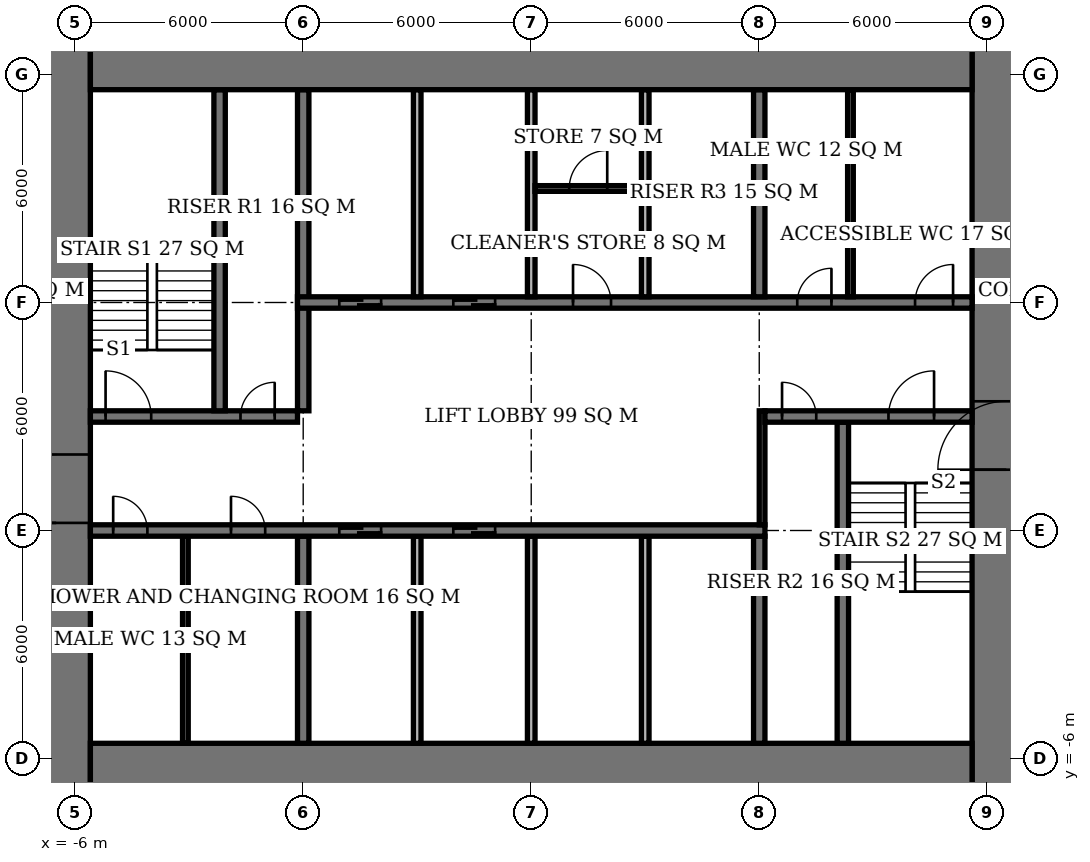
"""IFC4 building model, lengths in metres.
Left out: names, types, materials, properties, quantities, classifications, styles, units other than length and angle.
Written with IfcOpenShell. Run it as: python <this file> out.ifc"""

import sys

from ifc_helpers import new_model, si_unit, direction, frame, frame_2d, origin, place, context, subcontext, project, spatial, rectangle, extrude, element, fill, save


model = new_model("IFC4")
c1 = context("Model", 3, precision=1e-05, world=origin(), true_north=direction((0.0, 1.0)))
c2 = subcontext(c1, "Body", "Model", "MODEL_VIEW")
j1 = project(units=[si_unit("LENGTHUNIT", "METRE"), si_unit("PLANEANGLEUNIT", "RADIAN")], contexts=[c1])
p1 = place(None, origin())
s1 = spatial("IfcSite", under=j1, at=p1, CompositionType="ELEMENT")
p2 = place(p1, origin())
s2 = spatial("IfcBuilding", under=s1, at=p2, CompositionType="ELEMENT")
p3 = place(p2, frame((0.0, 0.0, 136.7)))
s3 = spatial("IfcBuildingStorey", under=s2, at=p3, CompositionType="ELEMENT", Elevation=136.7)
for number, where, z_axis, x_axis in (
    (1, (-5.6, -6.6, 0.0), (0.0, 0.0, 1.0), (1.0, 0.0, 0.0)),
    (2, (-5.6, 12.6, 0.0), (0.0, 0.0, 1.0), (1.0, 0.0, 0.0)),
):
    element("IfcWall", number, at=place(p3, frame(where, z_axis=z_axis, x_axis=x_axis)), inside=s3, PredefinedType="SHEAR", context=c2, shape_type="SweptSolid", body=[
        extrude(rectangle(XDim=23.2, YDim=2.0, at=frame_2d((11.6, 0.0))), origin(), (0.0, 0.0, 1.0), 3.9),
    ])
p4 = place(p3, frame((-6.5, -7.6, 0.0), z_axis=(0.0, 0.0, 1.0), x_axis=(0.0, 1.0, 0.0)))
e3 = element("IfcWall", 3, at=p4, inside=s3, PredefinedType="SHEAR", context=c2, shape_type="SweptSolid", body=[
    extrude(rectangle(XDim=21.2, YDim=1.8, at=frame_2d((10.6, 0.0))), origin(), (0.0, 0.0, 1.0), 3.9),
])
p5 = place(p4, frame((7.8, 0.0, 0.0)))
e4 = element("IfcOpeningElement", 4, at=p5, cuts=e3, PredefinedType="OPENING", context=c2, shape_type="SweptSolid", body=[
    extrude(rectangle(XDim=1.8, YDim=2.4, at=frame_2d((0.9, 1.2))), frame((0.0, 0.91, 0.0), z_axis=(0.0, -1.0, 0.0), x_axis=(1.0, 0.0, 0.0)), (0.0, 0.0, 1.0), 1.82),
])
p6 = place(p3, frame((18.5, -7.6, 0.0), z_axis=(0.0, 0.0, 1.0), x_axis=(0.0, 1.0, 0.0)))
e5 = element("IfcWall", 5, at=p6, inside=s3, PredefinedType="SHEAR", context=c2, shape_type="SweptSolid", body=[
    extrude(rectangle(XDim=21.2, YDim=1.8, at=frame_2d((10.6, 0.0))), origin(), (0.0, 0.0, 1.0), 3.9),
])
p7 = place(p6, frame((9.2, 0.0, 0.0)))
e6 = element("IfcOpeningElement", 6, at=p7, cuts=e5, PredefinedType="OPENING", context=c2, shape_type="SweptSolid", body=[
    extrude(rectangle(XDim=1.8, YDim=2.4, at=frame_2d((0.9, 1.2))), frame((0.0, 0.91, 0.0), z_axis=(0.0, -1.0, 0.0), x_axis=(1.0, 0.0, 0.0)), (0.0, 0.0, 1.0), 1.82),
])
p8 = place(p3, frame((-5.6, 0.0, 0.0), z_axis=(0.0, 0.0, 1.0), x_axis=(1.0, 0.0, 0.0)))
e7 = element("IfcWall", 7, at=p8, inside=s3, PredefinedType="SHEAR", context=c2, shape_type="SweptSolid", body=[
    extrude(rectangle(XDim=17.75, YDim=0.3, at=frame_2d((8.875, 0.0))), origin(), (0.0, 0.0, 1.0), 3.9),
])
p9 = place(p8, frame((0.6, 0.0, 0.0)))
e8 = element("IfcOpeningElement", 8, at=p9, cuts=e7, PredefinedType="OPENING", context=c2, shape_type="SweptSolid", body=[
    extrude(rectangle(XDim=0.9, YDim=2.1, at=frame_2d((0.45, 1.05))), frame((0.0, 0.16, 0.0), z_axis=(0.0, -1.0, 0.0), x_axis=(1.0, 0.0, 0.0)), (0.0, 0.0, 1.0), 0.32),
])
p10 = place(p8, frame((3.7, 0.0, 0.0)))
e9 = element("IfcOpeningElement", 9, at=p10, cuts=e7, PredefinedType="OPENING", context=c2, shape_type="SweptSolid", body=[
    extrude(rectangle(XDim=0.9, YDim=2.1, at=frame_2d((0.45, 1.05))), frame((0.0, 0.16, 0.0), z_axis=(0.0, -1.0, 0.0), x_axis=(1.0, 0.0, 0.0)), (0.0, 0.0, 1.0), 0.32),
])
p11 = place(p8, frame((6.55, 0.0, 0.0)))
e10 = element("IfcOpeningElement", 10, at=p11, cuts=e7, PredefinedType="OPENING", context=c2, shape_type="SweptSolid", body=[
    extrude(rectangle(XDim=1.1, YDim=2.1, at=frame_2d((0.55, 1.05))), frame((0.0, 0.16, 0.0), z_axis=(0.0, -1.0, 0.0), x_axis=(1.0, 0.0, 0.0)), (0.0, 0.0, 1.0), 0.32),
])
p12 = place(p8, frame((9.55, 0.0, 0.0)))
e11 = element("IfcOpeningElement", 11, at=p12, cuts=e7, PredefinedType="OPENING", context=c2, shape_type="SweptSolid", body=[
    extrude(rectangle(XDim=1.1, YDim=2.1, at=frame_2d((0.55, 1.05))), frame((0.0, 0.16, 0.0), z_axis=(0.0, -1.0, 0.0), x_axis=(1.0, 0.0, 0.0)), (0.0, 0.0, 1.0), 0.32),
])
p13 = place(p3, frame((-5.6, 3.0, 0.0), z_axis=(0.0, 0.0, 1.0), x_axis=(1.0, 0.0, 0.0)))
e12 = element("IfcWall", 12, at=p13, inside=s3, PredefinedType="SHEAR", context=c2, shape_type="SweptSolid", body=[
    extrude(rectangle(XDim=5.45, YDim=0.3, at=frame_2d((2.725, 0.0))), origin(), (0.0, 0.0, 1.0), 3.9),
])
p14 = place(p13, frame((0.4, 0.0, 0.0)))
e13 = element("IfcOpeningElement", 13, at=p14, cuts=e12, PredefinedType="OPENING", context=c2, shape_type="SweptSolid", body=[
    extrude(rectangle(XDim=1.2, YDim=2.1, at=frame_2d((0.6, 1.05))), frame((0.0, 0.16, 0.0), z_axis=(0.0, -1.0, 0.0), x_axis=(1.0, 0.0, 0.0)), (0.0, 0.0, 1.0), 0.32),
])
p15 = place(p13, frame((3.95, 0.0, 0.0)))
e14 = element("IfcOpeningElement", 14, at=p15, cuts=e12, PredefinedType="OPENING", context=c2, shape_type="SweptSolid", body=[
    extrude(rectangle(XDim=0.9, YDim=2.1, at=frame_2d((0.45, 1.05))), frame((0.0, 0.16, 0.0), z_axis=(0.0, -1.0, 0.0), x_axis=(1.0, 0.0, 0.0)), (0.0, 0.0, 1.0), 0.32),
])
p16 = place(p3, frame((12.15, 3.0, 0.0), z_axis=(0.0, 0.0, 1.0), x_axis=(1.0, 0.0, 0.0)))
e15 = element("IfcWall", 15, at=p16, inside=s3, PredefinedType="SHEAR", context=c2, shape_type="SweptSolid", body=[
    extrude(rectangle(XDim=5.45, YDim=0.3, at=frame_2d((2.725, 0.0))), origin(), (0.0, 0.0, 1.0), 3.9),
])
p17 = place(p16, frame((3.25, 0.0, 0.0)))
e16 = element("IfcOpeningElement", 16, at=p17, cuts=e15, PredefinedType="OPENING", context=c2, shape_type="SweptSolid", body=[
    extrude(rectangle(XDim=1.2, YDim=2.1, at=frame_2d((0.6, 1.05))), frame((0.0, 0.16, 0.0), z_axis=(0.0, -1.0, 0.0), x_axis=(1.0, 0.0, 0.0)), (0.0, 0.0, 1.0), 0.32),
])
p18 = place(p16, frame((0.45, 0.0, 0.0)))
e17 = element("IfcOpeningElement", 17, at=p18, cuts=e15, PredefinedType="OPENING", context=c2, shape_type="SweptSolid", body=[
    extrude(rectangle(XDim=0.9, YDim=2.1, at=frame_2d((0.45, 1.05))), frame((0.0, 0.16, 0.0), z_axis=(0.0, -1.0, 0.0), x_axis=(1.0, 0.0, 0.0)), (0.0, 0.0, 1.0), 0.32),
])
p19 = place(p3, frame((-0.15, 6.0, 0.0), z_axis=(0.0, 0.0, 1.0), x_axis=(1.0, 0.0, 0.0)))
e18 = element("IfcWall", 18, at=p19, inside=s3, PredefinedType="SHEAR", context=c2, shape_type="SweptSolid", body=[
    extrude(rectangle(XDim=17.75, YDim=0.3, at=frame_2d((8.875, 0.0))), origin(), (0.0, 0.0, 1.0), 3.9),
])
p20 = place(p19, frame((13.15, 0.0, 0.0)))
e19 = element("IfcOpeningElement", 19, at=p20, cuts=e18, PredefinedType="OPENING", context=c2, shape_type="SweptSolid", body=[
    extrude(rectangle(XDim=0.9, YDim=2.1, at=frame_2d((0.45, 1.05))), frame((0.0, 0.16, 0.0), z_axis=(0.0, -1.0, 0.0), x_axis=(1.0, 0.0, 0.0)), (0.0, 0.0, 1.0), 0.32),
])
p21 = place(p19, frame((16.25, 0.0, 0.0)))
e20 = element("IfcOpeningElement", 20, at=p21, cuts=e18, PredefinedType="OPENING", context=c2, shape_type="SweptSolid", body=[
    extrude(rectangle(XDim=1.0, YDim=2.1, at=frame_2d((0.5, 1.05))), frame((0.0, 0.16, 0.0), z_axis=(0.0, -1.0, 0.0), x_axis=(1.0, 0.0, 0.0)), (0.0, 0.0, 1.0), 0.32),
])
p22 = place(p19, frame((7.25, 0.0, 0.0)))
e21 = element("IfcOpeningElement", 21, at=p22, cuts=e18, PredefinedType="OPENING", context=c2, shape_type="SweptSolid", body=[
    extrude(rectangle(XDim=1.0, YDim=2.1, at=frame_2d((0.5, 1.05))), frame((0.0, 0.16, 0.0), z_axis=(0.0, -1.0, 0.0), x_axis=(1.0, 0.0, 0.0)), (0.0, 0.0, 1.0), 0.32),
])
p23 = place(p19, frame((1.1, 0.0, 0.0)))
e22 = element("IfcOpeningElement", 22, at=p23, cuts=e18, PredefinedType="OPENING", context=c2, shape_type="SweptSolid", body=[
    extrude(rectangle(XDim=1.1, YDim=2.1, at=frame_2d((0.55, 1.05))), frame((0.0, 0.16, 0.0), z_axis=(0.0, -1.0, 0.0), x_axis=(1.0, 0.0, 0.0)), (0.0, 0.0, 1.0), 0.32),
])
p24 = place(p19, frame((4.1, 0.0, 0.0)))
e23 = element("IfcOpeningElement", 23, at=p24, cuts=e18, PredefinedType="OPENING", context=c2, shape_type="SweptSolid", body=[
    extrude(rectangle(XDim=1.1, YDim=2.1, at=frame_2d((0.55, 1.05))), frame((0.0, 0.16, 0.0), z_axis=(0.0, -1.0, 0.0), x_axis=(1.0, 0.0, 0.0)), (0.0, 0.0, 1.0), 0.32),
])
p25 = place(p3, frame((0.0, -5.6, 0.0), z_axis=(0.0, 0.0, 1.0), x_axis=(0.0, 1.0, 0.0)))
e24 = element("IfcWall", 24, at=p25, inside=s3, PredefinedType="SHEAR", context=c2, shape_type="SweptSolid", body=[
    extrude(rectangle(XDim=5.45, YDim=0.3, at=frame_2d((2.725, 0.0))), origin(), (0.0, 0.0, 1.0), 3.9),
])
p26 = place(p3, frame((0.0, 3.15, 0.0), z_axis=(0.0, 0.0, 1.0), x_axis=(0.0, 1.0, 0.0)))
e25 = element("IfcWall", 25, at=p26, inside=s3, PredefinedType="SHEAR", context=c2, shape_type="SweptSolid", body=[
    extrude(rectangle(XDim=8.45, YDim=0.3, at=frame_2d((4.225, 0.0))), origin(), (0.0, 0.0, 1.0), 3.9),
])
for number, where, z_axis, x_axis in (
    (26, (12.0, -5.6, 0.0), (0.0, 0.0, 1.0), (0.0, 1.0, 0.0)),
    (27, (12.0, 6.15, 0.0), (0.0, 0.0, 1.0), (0.0, 1.0, 0.0)),
):
    element("IfcWall", number, at=place(p3, frame(where, z_axis=z_axis, x_axis=x_axis)), inside=s3, PredefinedType="SHEAR", context=c2, shape_type="SweptSolid", body=[
        extrude(rectangle(XDim=5.45, YDim=0.3, at=frame_2d((2.725, 0.0))), origin(), (0.0, 0.0, 1.0), 3.9),
    ])
for number, where, z_axis, x_axis in (
    (28, (-2.2, 3.15, 0.0), (0.0, 0.0, 1.0), (0.0, 1.0, 0.0)),
    (29, (14.2, -5.6, 0.0), (0.0, 0.0, 1.0), (0.0, 1.0, 0.0)),
):
    element("IfcWall", number, at=place(p3, frame(where, z_axis=z_axis, x_axis=x_axis)), inside=s3, PredefinedType="SHEAR", context=c2, shape_type="SweptSolid", body=[
        extrude(rectangle(XDim=8.45, YDim=0.3, at=frame_2d((4.225, 0.0))), origin(), (0.0, 0.0, 1.0), 3.9),
    ])
for number, where, z_axis, x_axis in (
    (30, (3.0, 6.15, 0.0), (0.0, 0.0, 1.0), (0.0, 1.0, 0.0)),
    (31, (6.0, 6.15, 0.0), (0.0, 0.0, 1.0), (0.0, 1.0, 0.0)),
    (32, (9.0, 6.15, 0.0), (0.0, 0.0, 1.0), (0.0, 1.0, 0.0)),
    (33, (3.0, -5.6, 0.0), (0.0, 0.0, 1.0), (0.0, 1.0, 0.0)),
    (34, (6.0, -5.6, 0.0), (0.0, 0.0, 1.0), (0.0, 1.0, 0.0)),
    (35, (9.0, -5.6, 0.0), (0.0, 0.0, 1.0), (0.0, 1.0, 0.0)),
):
    element("IfcWall", number, at=place(p3, frame(where, z_axis=z_axis, x_axis=x_axis)), inside=s3, PredefinedType="SOLIDWALL", context=c2, shape_type="SweptSolid", body=[
        extrude(rectangle(XDim=5.45, YDim=0.2, at=frame_2d((2.725, 0.0))), origin(), (0.0, 0.0, 1.0), 3.9),
    ])
for number, where, z_axis, x_axis in (
    (36, (-3.1, -5.6, 0.0), (0.0, 0.0, 1.0), (0.0, 1.0, 0.0)),
    (37, (14.4, 6.15, 0.0), (0.0, 0.0, 1.0), (0.0, 1.0, 0.0)),
):
    element("IfcWall", number, at=place(p3, frame(where, z_axis=z_axis, x_axis=x_axis)), inside=s3, PredefinedType="PLUMBINGWALL", context=c2, shape_type="SweptSolid", body=[
        extrude(rectangle(XDim=5.45, YDim=0.15, at=frame_2d((2.725, 0.0))), origin(), (0.0, 0.0, 1.0), 3.65),
    ])
p27 = place(p3, frame((6.1, 9.0, 0.0), z_axis=(0.0, 0.0, 1.0), x_axis=(1.0, 0.0, 0.0)))
e38 = element("IfcWall", 38, at=p27, inside=s3, PredefinedType="PARTITIONING", context=c2, shape_type="SweptSolid", body=[
    extrude(rectangle(XDim=2.8, YDim=0.15, at=frame_2d((1.4, 0.0))), origin(), (0.0, 0.0, 1.0), 3.65),
])
p28 = place(p27, frame((0.9, 0.0, 0.0)))
e39 = element("IfcOpeningElement", 39, at=p28, cuts=e38, PredefinedType="OPENING", context=c2, shape_type="SweptSolid", body=[
    extrude(rectangle(XDim=1.0, YDim=2.1, at=frame_2d((0.5, 1.05))), frame((0.0, 0.085, 0.0), z_axis=(0.0, -1.0, 0.0), x_axis=(1.0, 0.0, 0.0)), (0.0, 0.0, 1.0), 0.17),
])
p29 = place(p3, frame((12.075, 0.15, 0.0), z_axis=(0.0, 0.0, 1.0), x_axis=(0.0, 1.0, 0.0)))
e40 = element("IfcWall", 40, at=p29, inside=s3, PredefinedType="PARTITIONING", context=c2, shape_type="SweptSolid", body=[
    extrude(rectangle(XDim=3.0, YDim=0.15, at=frame_2d((1.5, 0.0))), origin(), (0.0, 0.0, 1.0), 3.65),
])
p30 = place(p5, origin())
e41 = element("IfcDoor", 41, at=p30, inside=s3, OperationType="DOUBLE_DOOR_SINGLE_SWING", PredefinedType="DOOR", context=c2, shape_type="SweptSolid", body=[
    extrude(rectangle(XDim=1.8, YDim=2.4, at=frame_2d((0.9, 1.2))), frame((0.0, 0.025, 0.0), z_axis=(0.0, -1.0, 0.0), x_axis=(1.0, 0.0, 0.0)), (0.0, 0.0, 1.0), 0.05),
])
fill(e4, e41)
p31 = place(p7, origin())
e42 = element("IfcDoor", 42, at=p31, inside=s3, OperationType="DOUBLE_DOOR_SINGLE_SWING", PredefinedType="DOOR", context=c2, shape_type="SweptSolid", body=[
    extrude(rectangle(XDim=1.8, YDim=2.4, at=frame_2d((0.9, 1.2))), frame((0.0, 0.025, 0.0), z_axis=(0.0, -1.0, 0.0), x_axis=(1.0, 0.0, 0.0)), (0.0, 0.0, 1.0), 0.05),
])
fill(e6, e42)
p32 = place(p14, origin())
e43 = element("IfcDoor", 43, at=p32, inside=s3, OperationType="SINGLE_SWING_LEFT", PredefinedType="DOOR", context=c2, shape_type="SweptSolid", body=[
    extrude(rectangle(XDim=1.2, YDim=2.1, at=frame_2d((0.6, 1.05))), frame((0.0, 0.025, 0.0), z_axis=(0.0, -1.0, 0.0), x_axis=(1.0, 0.0, 0.0)), (0.0, 0.0, 1.0), 0.05),
])
fill(e13, e43)
p33 = place(p15, origin())
e44 = element("IfcDoor", 44, at=p33, inside=s3, OperationType="SINGLE_SWING_RIGHT", PredefinedType="DOOR", context=c2, shape_type="SweptSolid", body=[
    extrude(rectangle(XDim=0.9, YDim=2.1, at=frame_2d((0.45, 1.05))), frame((0.0, 0.025, 0.0), z_axis=(0.0, -1.0, 0.0), x_axis=(1.0, 0.0, 0.0)), (0.0, 0.0, 1.0), 0.05),
])
fill(e14, e44)
p34 = place(p17, origin())
e45 = element("IfcDoor", 45, at=p34, inside=s3, OperationType="SINGLE_SWING_RIGHT", PredefinedType="DOOR", context=c2, shape_type="SweptSolid", body=[
    extrude(rectangle(XDim=1.2, YDim=2.1, at=frame_2d((0.6, 1.05))), frame((0.0, 0.025, 0.0), z_axis=(0.0, -1.0, 0.0), x_axis=(1.0, 0.0, 0.0)), (0.0, 0.0, 1.0), 0.05),
])
fill(e16, e45)
p35 = place(p18, origin())
e46 = element("IfcDoor", 46, at=p35, inside=s3, OperationType="SINGLE_SWING_LEFT", PredefinedType="DOOR", context=c2, shape_type="SweptSolid", body=[
    extrude(rectangle(XDim=0.9, YDim=2.1, at=frame_2d((0.45, 1.05))), frame((0.0, 0.025, 0.0), z_axis=(0.0, -1.0, 0.0), x_axis=(1.0, 0.0, 0.0)), (0.0, 0.0, 1.0), 0.05),
])
fill(e17, e46)
p36 = place(p9, origin())
e47 = element("IfcDoor", 47, at=p36, inside=s3, OperationType="SINGLE_SWING_LEFT", PredefinedType="DOOR", context=c2, shape_type="SweptSolid", body=[
    extrude(rectangle(XDim=0.9, YDim=2.1, at=frame_2d((0.45, 1.05))), frame((0.0, 0.025, 0.0), z_axis=(0.0, -1.0, 0.0), x_axis=(1.0, 0.0, 0.0)), (0.0, 0.0, 1.0), 0.05),
])
fill(e8, e47)
p37 = place(p10, origin())
e48 = element("IfcDoor", 48, at=p37, inside=s3, OperationType="SINGLE_SWING_LEFT", PredefinedType="DOOR", context=c2, shape_type="SweptSolid", body=[
    extrude(rectangle(XDim=0.9, YDim=2.1, at=frame_2d((0.45, 1.05))), frame((0.0, 0.025, 0.0), z_axis=(0.0, -1.0, 0.0), x_axis=(1.0, 0.0, 0.0)), (0.0, 0.0, 1.0), 0.05),
])
fill(e9, e48)
p38 = place(p20, origin())
e49 = element("IfcDoor", 49, at=p38, inside=s3, OperationType="SINGLE_SWING_RIGHT", PredefinedType="DOOR", context=c2, shape_type="SweptSolid", body=[
    extrude(rectangle(XDim=0.9, YDim=2.1, at=frame_2d((0.45, 1.05))), frame((0.0, 0.025, 0.0), z_axis=(0.0, -1.0, 0.0), x_axis=(1.0, 0.0, 0.0)), (0.0, 0.0, 1.0), 0.05),
])
fill(e19, e49)
p39 = place(p21, origin())
e50 = element("IfcDoor", 50, at=p39, inside=s3, OperationType="SINGLE_SWING_RIGHT", PredefinedType="DOOR", context=c2, shape_type="SweptSolid", body=[
    extrude(rectangle(XDim=1.0, YDim=2.1, at=frame_2d((0.5, 1.05))), frame((0.0, 0.025, 0.0), z_axis=(0.0, -1.0, 0.0), x_axis=(1.0, 0.0, 0.0)), (0.0, 0.0, 1.0), 0.05),
])
fill(e20, e50)
p40 = place(p28, origin())
e51 = element("IfcDoor", 51, at=p40, inside=s3, OperationType="SINGLE_SWING_RIGHT", PredefinedType="DOOR", context=c2, shape_type="SweptSolid", body=[
    extrude(rectangle(XDim=1.0, YDim=2.1, at=frame_2d((0.5, 1.05))), frame((0.0, 0.025, 0.0), z_axis=(0.0, -1.0, 0.0), x_axis=(1.0, 0.0, 0.0)), (0.0, 0.0, 1.0), 0.05),
])
fill(e39, e51)
p41 = place(p22, origin())
e52 = element("IfcDoor", 52, at=p41, inside=s3, OperationType="SINGLE_SWING_LEFT", PredefinedType="DOOR", context=c2, shape_type="SweptSolid", body=[
    extrude(rectangle(XDim=1.0, YDim=2.1, at=frame_2d((0.5, 1.05))), frame((0.0, 0.025, 0.0), z_axis=(0.0, -1.0, 0.0), x_axis=(1.0, 0.0, 0.0)), (0.0, 0.0, 1.0), 0.05),
])
fill(e21, e52)
p42 = place(p23, origin())
e53 = element("IfcDoor", 53, at=p42, inside=s3, OperationType="DOUBLE_DOOR_SLIDING", PredefinedType="USERDEFINED", context=c2, shape_type="SweptSolid", body=[
    extrude(rectangle(XDim=1.1, YDim=2.1, at=frame_2d((0.55, 1.05))), frame((0.0, 0.025, 0.0), z_axis=(0.0, -1.0, 0.0), x_axis=(1.0, 0.0, 0.0)), (0.0, 0.0, 1.0), 0.05),
])
fill(e22, e53)
p43 = place(p24, origin())
e54 = element("IfcDoor", 54, at=p43, inside=s3, OperationType="DOUBLE_DOOR_SLIDING", PredefinedType="USERDEFINED", context=c2, shape_type="SweptSolid", body=[
    extrude(rectangle(XDim=1.1, YDim=2.1, at=frame_2d((0.55, 1.05))), frame((0.0, 0.025, 0.0), z_axis=(0.0, -1.0, 0.0), x_axis=(1.0, 0.0, 0.0)), (0.0, 0.0, 1.0), 0.05),
])
fill(e23, e54)
p44 = place(p11, origin())
e55 = element("IfcDoor", 55, at=p44, inside=s3, OperationType="DOUBLE_DOOR_SLIDING", PredefinedType="USERDEFINED", context=c2, shape_type="SweptSolid", body=[
    extrude(rectangle(XDim=1.1, YDim=2.1, at=frame_2d((0.55, 1.05))), frame((0.0, 0.025, 0.0), z_axis=(0.0, -1.0, 0.0), x_axis=(1.0, 0.0, 0.0)), (0.0, 0.0, 1.0), 0.05),
])
fill(e10, e55)
p45 = place(p12, origin())
e56 = element("IfcDoor", 56, at=p45, inside=s3, OperationType="DOUBLE_DOOR_SLIDING", PredefinedType="USERDEFINED", context=c2, shape_type="SweptSolid", body=[
    extrude(rectangle(XDim=1.1, YDim=2.1, at=frame_2d((0.55, 1.05))), frame((0.0, 0.025, 0.0), z_axis=(0.0, -1.0, 0.0), x_axis=(1.0, 0.0, 0.0)), (0.0, 0.0, 1.0), 0.05),
])
fill(e11, e56)
save(model, sys.argv[1])
